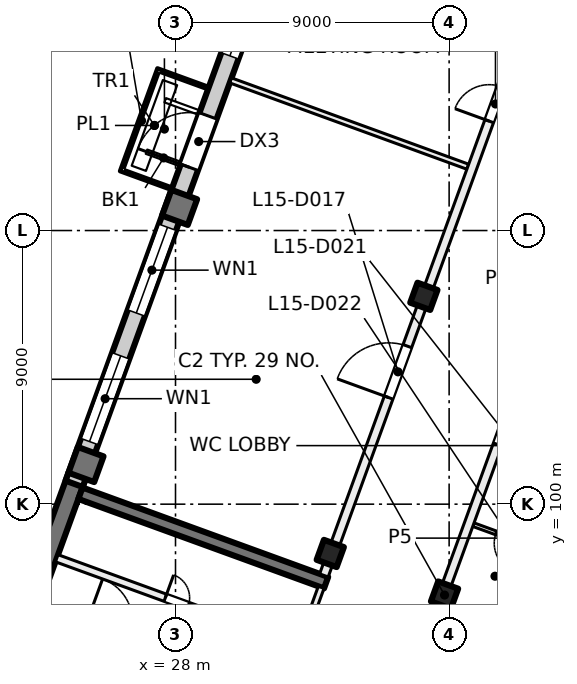
"""IFC4 building model, lengths in metres.
Left out: names, types, materials, properties, quantities, classifications, styles, units other than length and angle.
Written with IfcOpenShell. Run it as: python <this file> out.ifc"""

import sys

from ifc_helpers import new_model, si_unit, direction, frame, frame_2d, origin, origin_2d, place, context, subcontext, project, spatial, rectangle, extrude, element, fill, save


model = new_model("IFC4")
c1 = context("Model", 3, precision=1e-05, world=origin(), true_north=direction((0.0, 1.0)))
c2 = subcontext(c1, "Body", "Model", "MODEL_VIEW")
j1 = project(units=[si_unit("LENGTHUNIT", "METRE"), si_unit("PLANEANGLEUNIT", "RADIAN")], contexts=[c1])
p1 = place(None, origin())
s1 = spatial("IfcSite", under=j1, at=p1, CompositionType="ELEMENT")
p2 = place(p1, origin())
s2 = spatial("IfcBuilding", under=s1, at=p2, CompositionType="ELEMENT")
p3 = place(p2, frame((0.0, 0.0, 67.5)))
s3 = spatial("IfcBuildingStorey", under=s2, at=p3, CompositionType="ELEMENT", Elevation=67.5)
for number, where, z_axis, x_axis in (
    (1, (36.849, 97.011, 0.0), (0.0, 0.0, 1.0), (-0.342, -0.94, 0.0)),
    (2, (36.169, 106.836, 0.0), (0.0, 0.0, 1.0), (-0.342, -0.94, 0.0)),
    (3, (33.091, 98.379, 0.0), (0.0, 0.0, 1.0), (-0.342, -0.94, 0.0)),
):
    element("IfcColumn", number, at=place(p3, frame(where, z_axis=z_axis, x_axis=x_axis)), inside=s3, PredefinedType="COLUMN", context=c2, shape_type="SweptSolid", body=[
        extrude(rectangle(XDim=0.7, YDim=0.7, at=origin_2d()), origin(), (0.0, 0.0, 1.0), 4.0),
    ])
for number, where, z_axis, x_axis in (
    (4, (28.134, 109.76, 0.0), (0.0, 0.0, 1.0), (-0.342, -0.94, 0.0)),
    (5, (25.056, 101.303, 0.0), (0.0, 0.0, 1.0), (-0.342, -0.94, 0.0)),
):
    element("IfcColumn", number, at=place(p3, frame(where, z_axis=z_axis, x_axis=x_axis)), inside=s3, PredefinedType="COLUMN", context=c2, shape_type="SweptSolid", body=[
        extrude(rectangle(XDim=0.9, YDim=0.9, at=origin_2d()), origin(), (0.0, 0.0, 1.0), 4.0),
    ])
p4 = place(p3, frame((21.717, 92.568, 0.0), z_axis=(0.0, 0.0, 1.0), x_axis=(0.342016162452, 0.939694069696, 0.0)))
e6 = element("IfcWall", 6, at=p4, inside=s3, PredefinedType="SHEAR", context=c2, shape_type="SweptSolid", body=[
    extrude(rectangle(XDim=8.9, YDim=0.6, at=frame_2d((4.45, 0.0))), origin(), (0.0, 0.0, 1.0), 4.0),
])
p5 = place(p3, frame((32.953, 97.418, 0.0), z_axis=(0.0, 0.0, 1.0), x_axis=(-0.93969060187, 0.342025690201, 0.0)))
e7 = element("IfcWall", 7, at=p5, inside=s3, PredefinedType="SHEAR", context=c2, shape_type="SweptSolid", body=[
    extrude(rectangle(XDim=8.6, YDim=0.4, at=frame_2d((4.3, 0.0))), origin(), (0.0, 0.0, 1.0), 4.0),
])
p6 = place(p3, frame((24.666, 100.669, 0.0), z_axis=(0.0, 0.0, 1.0), x_axis=(0.34201964167, 0.939692803373, 0.0)))
e8 = element("IfcWall", 8, at=p6, inside=s3, PredefinedType="SOLIDWALL", context=c2, shape_type="SweptSolid", body=[
    extrude(rectangle(XDim=32.884, YDim=0.6, at=frame_2d((16.442, 0.0))), origin(), (0.0, 0.0, 1.0), 3.625),
])
p7 = place(p6, frame((1.48, 0.0, 0.9)))
e9 = element("IfcOpeningElement", 9, at=p7, cuts=e8, PredefinedType="OPENING", context=c2, shape_type="SweptSolid", body=[
    extrude(rectangle(XDim=3.0, YDim=2.4, at=frame_2d((1.5, 1.2))), frame((0.0, 0.31, 0.0), z_axis=(0.0, -1.0, 0.0), x_axis=(1.0, 0.0, 0.0)), (0.0, 0.0, 1.0), 0.62),
])
p8 = place(p6, frame((5.98, 0.0, 0.9)))
e10 = element("IfcOpeningElement", 10, at=p8, cuts=e8, PredefinedType="OPENING", context=c2, shape_type="SweptSolid", body=[
    extrude(rectangle(XDim=3.0, YDim=2.4, at=frame_2d((1.5, 1.2))), frame((0.0, 0.31, 0.0), z_axis=(0.0, -1.0, 0.0), x_axis=(1.0, 0.0, 0.0)), (0.0, 0.0, 1.0), 0.62),
])
p9 = place(p6, frame((11.08, 0.0, 0.0)))
e11 = element("IfcOpeningElement", 11, at=p9, cuts=e8, PredefinedType="OPENING", context=c2, shape_type="SweptSolid", body=[
    extrude(rectangle(XDim=1.8, YDim=2.4, at=frame_2d((0.9, 1.2))), frame((0.0, 0.31, 0.0), z_axis=(0.0, -1.0, 0.0), x_axis=(1.0, 0.0, 0.0)), (0.0, 0.0, 1.0), 0.62),
])
p10 = place(p6, frame((14.98, 0.0, 0.9)))
e12 = element("IfcOpeningElement", 12, at=p10, cuts=e8, PredefinedType="OPENING", context=c2, shape_type="SweptSolid", body=[
    extrude(rectangle(XDim=3.0, YDim=2.4, at=frame_2d((1.5, 1.2))), frame((0.0, 0.31, 0.0), z_axis=(0.0, -1.0, 0.0), x_axis=(1.0, 0.0, 0.0)), (0.0, 0.0, 1.0), 0.62),
])
p11 = place(p6, frame((19.48, 0.0, 0.9)))
e13 = element("IfcOpeningElement", 13, at=p11, cuts=e8, PredefinedType="OPENING", context=c2, shape_type="SweptSolid", body=[
    extrude(rectangle(XDim=3.0, YDim=2.4, at=frame_2d((1.5, 1.2))), frame((0.0, 0.31, 0.0), z_axis=(0.0, -1.0, 0.0), x_axis=(1.0, 0.0, 0.0)), (0.0, 0.0, 1.0), 0.62),
])
p12 = place(p6, frame((24.58, 0.0, 0.0)))
e14 = element("IfcOpeningElement", 14, at=p12, cuts=e8, PredefinedType="OPENING", context=c2, shape_type="SweptSolid", body=[
    extrude(rectangle(XDim=1.8, YDim=2.4, at=frame_2d((0.9, 1.2))), frame((0.0, 0.31, 0.0), z_axis=(0.0, -1.0, 0.0), x_axis=(1.0, 0.0, 0.0)), (0.0, 0.0, 1.0), 0.62),
])
p13 = place(p6, frame((28.48, 0.0, 0.9)))
e15 = element("IfcOpeningElement", 15, at=p13, cuts=e8, PredefinedType="OPENING", context=c2, shape_type="SweptSolid", body=[
    extrude(rectangle(XDim=3.0, YDim=2.4, at=frame_2d((1.5, 1.2))), frame((0.0, 0.31, 0.0), z_axis=(0.0, -1.0, 0.0), x_axis=(1.0, 0.0, 0.0)), (0.0, 0.0, 1.0), 0.62),
])
p14 = place(p3, frame((31.491, 93.693, 0.0), z_axis=(0.0, 0.0, 1.0), x_axis=(0.341995824804, 0.939701471648, 0.0)))
e16 = element("IfcWall", 16, at=p14, inside=s3, PredefinedType="PARTITIONING", context=c2, shape_type="SweptSolid", body=[
    extrude(rectangle(XDim=3.8, YDim=0.2, at=frame_2d((1.9, 0.0))), origin(), (0.0, 0.0, 1.0), 3.625),
])
p15 = place(p14, frame((0.3, 0.0, 0.0)))
e17 = element("IfcOpeningElement", 17, at=p15, cuts=e16, PredefinedType="OPENING", context=c2, shape_type="SweptSolid", body=[
    extrude(rectangle(XDim=1.2, YDim=2.1, at=frame_2d((0.6, 1.05))), frame((0.0, 0.11, 0.0), z_axis=(0.0, -1.0, 0.0), x_axis=(1.0, 0.0, 0.0)), (0.0, 0.0, 1.0), 0.22),
])
p16 = place(p3, frame((23.538, 96.694, 0.0), z_axis=(0.0, 0.0, 1.0), x_axis=(0.939691552312, -0.342023078919, 0.0)))
e18 = element("IfcWall", 18, at=p16, inside=s3, PredefinedType="PARTITIONING", context=c2, shape_type="SweptSolid", body=[
    extrude(rectangle(XDim=8.4, YDim=0.2, at=frame_2d((4.2, 0.0))), origin(), (0.0, 0.0, 1.0), 3.625),
])
p17 = place(p16, frame((1.65, 0.0, 0.0)))
e19 = element("IfcOpeningElement", 19, at=p17, cuts=e18, PredefinedType="OPENING", context=c2, shape_type="SweptSolid", body=[
    extrude(rectangle(XDim=1.5, YDim=2.1, at=frame_2d((0.75, 1.05))), frame((0.0, 0.11, 0.0), z_axis=(0.0, -1.0, 0.0), x_axis=(1.0, 0.0, 0.0)), (0.0, 0.0, 1.0), 0.22),
])
p18 = place(p3, frame((24.094, 98.221, 0.0), z_axis=(0.0, 0.0, 1.0), x_axis=(0.939691552312, -0.342023078919, 0.0)))
e20 = element("IfcWall", 20, at=p18, inside=s3, PredefinedType="PARTITIONING", context=c2, shape_type="SweptSolid", body=[
    extrude(rectangle(XDim=8.4, YDim=0.25, at=frame_2d((4.2, 0.0))), origin(), (0.0, 0.0, 1.0), 3.625),
])
p19 = place(p18, frame((3.8, 0.0, 0.0)))
e21 = element("IfcOpeningElement", 21, at=p19, cuts=e20, PredefinedType="OPENING", context=c2, shape_type="SweptSolid", body=[
    extrude(rectangle(XDim=0.8, YDim=2.1, at=frame_2d((0.4, 1.05))), frame((0.0, 0.135, 0.0), z_axis=(0.0, -1.0, 0.0), x_axis=(1.0, 0.0, 0.0)), (0.0, 0.0, 1.0), 0.27),
])
p20 = place(p3, frame((29.814, 113.938, 0.0), z_axis=(0.0, 0.0, 1.0), x_axis=(0.939697205528, -0.342007546586, 0.0)))
e22 = element("IfcWall", 22, at=p20, inside=s3, PredefinedType="PARTITIONING", context=c2, shape_type="SweptSolid", body=[
    extrude(rectangle(XDim=8.301, YDim=0.175, at=frame_2d((4.15, 0.0))), origin(), (0.0, 0.0, 1.0), 3.625),
])
p21 = place(p3, frame((32.881, 97.657, 0.0), z_axis=(0.0, 0.0, 1.0), x_axis=(0.342017360004, 0.939693633828, 0.0)))
e23 = element("IfcWall", 23, at=p21, inside=s3, PredefinedType="PARTITIONING", context=c2, shape_type="SweptSolid", body=[
    extrude(rectangle(XDim=34.516, YDim=0.3, at=frame_2d((17.258, 0.0))), origin(), (0.0, 0.0, 1.0), 3.625),
])
p22 = place(p21, frame((6.225, 0.0, 0.0)))
e24 = element("IfcOpeningElement", 24, at=p22, cuts=e23, PredefinedType="OPENING", context=c2, shape_type="SweptSolid", body=[
    extrude(rectangle(XDim=1.8, YDim=2.1, at=frame_2d((0.9, 1.05))), frame((0.0, 0.16, 0.0), z_axis=(0.0, -1.0, 0.0), x_axis=(1.0, 0.0, 0.0)), (0.0, 0.0, 1.0), 0.32),
])
p23 = place(p21, frame((15.9, 0.0, 0.0)))
e25 = element("IfcOpeningElement", 25, at=p23, cuts=e23, PredefinedType="OPENING", context=c2, shape_type="SweptSolid", body=[
    extrude(rectangle(XDim=1.2, YDim=2.1, at=frame_2d((0.6, 1.05))), frame((0.0, 0.16, 0.0), z_axis=(0.0, -1.0, 0.0), x_axis=(1.0, 0.0, 0.0)), (0.0, 0.0, 1.0), 0.32),
])
p24 = place(p21, frame((20.5, 0.0, 0.0)))
e26 = element("IfcOpeningElement", 26, at=p24, cuts=e23, PredefinedType="OPENING", context=c2, shape_type="SweptSolid", body=[
    extrude(rectangle(XDim=1.0, YDim=2.1, at=frame_2d((0.5, 1.05))), frame((0.0, 0.16, 0.0), z_axis=(0.0, -1.0, 0.0), x_axis=(1.0, 0.0, 0.0)), (0.0, 0.0, 1.0), 0.32),
])
p25 = place(p21, frame((25.0, 0.0, 0.0)))
e27 = element("IfcOpeningElement", 27, at=p25, cuts=e23, PredefinedType="OPENING", context=c2, shape_type="SweptSolid", body=[
    extrude(rectangle(XDim=1.0, YDim=2.1, at=frame_2d((0.5, 1.05))), frame((0.0, 0.16, 0.0), z_axis=(0.0, -1.0, 0.0), x_axis=(1.0, 0.0, 0.0)), (0.0, 0.0, 1.0), 0.32),
])
p26 = place(p21, frame((30.562, 0.0, 0.0)))
e28 = element("IfcOpeningElement", 28, at=p26, cuts=e23, PredefinedType="OPENING", context=c2, shape_type="SweptSolid", body=[
    extrude(rectangle(XDim=1.0, YDim=2.1, at=frame_2d((0.5, 1.05))), frame((0.0, 0.16, 0.0), z_axis=(0.0, -1.0, 0.0), x_axis=(1.0, 0.0, 0.0)), (0.0, 0.0, 1.0), 0.32),
])
p27 = place(p3, frame((40.229, 98.441, 0.0), z_axis=(0.0, 0.0, 1.0), x_axis=(-0.939663852573, 0.342099173001, 0.0)))
e29 = element("IfcWall", 29, at=p27, inside=s3, PredefinedType="PARTITIONING", context=c2, shape_type="SweptSolid", body=[
    extrude(rectangle(XDim=2.587, YDim=0.125, at=frame_2d((1.293, 0.0))), origin(), (0.0, 0.0, 1.0), 3.625),
])
p28 = place(p27, frame((0.794, 0.0, 0.0)))
e30 = element("IfcOpeningElement", 30, at=p28, cuts=e29, PredefinedType="OPENING", context=c2, shape_type="SweptSolid", body=[
    extrude(rectangle(XDim=1.0, YDim=2.1, at=frame_2d((0.5, 1.05))), frame((0.0, 0.073, 0.0), z_axis=(0.0, -1.0, 0.0), x_axis=(1.0, 0.0, 0.0)), (0.0, 0.0, 1.0), 0.145),
])
p29 = place(p3, frame((44.612, 118.483, 0.0), z_axis=(0.0, 0.0, 1.0), x_axis=(-0.342043123066, -0.939684256526, 0.0)))
e31 = element("IfcWall", 31, at=p29, inside=s3, PredefinedType="PARTITIONING", context=c2, shape_type="SweptSolid", body=[
    extrude(rectangle(XDim=23.582, YDim=0.3, at=frame_2d((11.791, 0.0))), origin(), (0.0, 0.0, 1.0), 3.625),
])
p30 = place(p29, frame((16.583, 0.0, 0.0)))
e32 = element("IfcOpeningElement", 32, at=p30, cuts=e31, PredefinedType="OPENING", context=c2, shape_type="SweptSolid", body=[
    extrude(rectangle(XDim=1.0, YDim=2.1, at=frame_2d((0.5, 1.05))), frame((0.0, 0.16, 0.0), z_axis=(0.0, -1.0, 0.0), x_axis=(1.0, 0.0, 0.0)), (0.0, 0.0, 1.0), 0.32),
])
p31 = place(p29, frame((10.982, 0.0, 0.0)))
e33 = element("IfcOpeningElement", 33, at=p31, cuts=e31, PredefinedType="OPENING", context=c2, shape_type="SweptSolid", body=[
    extrude(rectangle(XDim=1.2, YDim=2.1, at=frame_2d((0.6, 1.05))), frame((0.0, 0.16, 0.0), z_axis=(0.0, -1.0, 0.0), x_axis=(1.0, 0.0, 0.0)), (0.0, 0.0, 1.0), 0.32),
])
p32 = place(p29, frame((5.756, 0.0, 0.0)))
e34 = element("IfcOpeningElement", 34, at=p32, cuts=e31, PredefinedType="OPENING", context=c2, shape_type="SweptSolid", body=[
    extrude(rectangle(XDim=1.8, YDim=2.1, at=frame_2d((0.9, 1.05))), frame((0.0, 0.16, 0.0), z_axis=(0.0, -1.0, 0.0), x_axis=(1.0, 0.0, 0.0)), (0.0, 0.0, 1.0), 0.32),
])
p33 = place(p7, origin())
e35 = element("IfcWindow", 35, at=p33, inside=s3, PartitioningType="SINGLE_PANEL", PredefinedType="WINDOW", context=c2, shape_type="SweptSolid", body=[
    extrude(rectangle(XDim=3.0, YDim=2.4, at=frame_2d((1.5, 1.2))), frame((0.0, 0.03, 0.0), z_axis=(0.0, -1.0, 0.0), x_axis=(1.0, 0.0, 0.0)), (0.0, 0.0, 1.0), 0.06),
])
fill(e9, e35)
p34 = place(p8, origin())
e36 = element("IfcWindow", 36, at=p34, inside=s3, PartitioningType="SINGLE_PANEL", PredefinedType="WINDOW", context=c2, shape_type="SweptSolid", body=[
    extrude(rectangle(XDim=3.0, YDim=2.4, at=frame_2d((1.5, 1.2))), frame((0.0, 0.03, 0.0), z_axis=(0.0, -1.0, 0.0), x_axis=(1.0, 0.0, 0.0)), (0.0, 0.0, 1.0), 0.06),
])
fill(e10, e36)
p35 = place(p9, origin())
e37 = element("IfcDoor", 37, at=p35, inside=s3, OperationType="DOUBLE_DOOR_SINGLE_SWING", PredefinedType="DOOR", context=c2, shape_type="SweptSolid", body=[
    extrude(rectangle(XDim=1.8, YDim=2.4, at=frame_2d((0.9, 1.2))), frame((0.0, 0.025, 0.0), z_axis=(0.0, -1.0, 0.0), x_axis=(1.0, 0.0, 0.0)), (0.0, 0.0, 1.0), 0.05),
])
fill(e11, e37)
p36 = place(p10, origin())
e38 = element("IfcWindow", 38, at=p36, inside=s3, PartitioningType="SINGLE_PANEL", PredefinedType="WINDOW", context=c2, shape_type="SweptSolid", body=[
    extrude(rectangle(XDim=3.0, YDim=2.4, at=frame_2d((1.5, 1.2))), frame((0.0, 0.03, 0.0), z_axis=(0.0, -1.0, 0.0), x_axis=(1.0, 0.0, 0.0)), (0.0, 0.0, 1.0), 0.06),
])
fill(e12, e38)
p37 = place(p19, origin())
e39 = element("IfcDoor", 39, at=p37, inside=s3, OperationType="SINGLE_SWING_LEFT", PredefinedType="DOOR", context=c2, shape_type="SweptSolid", body=[
    extrude(rectangle(XDim=0.8, YDim=2.1, at=frame_2d((0.4, 1.05))), frame((0.0, 0.025, 0.0), z_axis=(0.0, -1.0, 0.0), x_axis=(1.0, 0.0, 0.0)), (0.0, 0.0, 1.0), 0.05),
])
fill(e21, e39)
p38 = place(p22, origin())
e40 = element("IfcDoor", 40, at=p38, inside=s3, OperationType="DOUBLE_DOOR_SINGLE_SWING", PredefinedType="DOOR", context=c2, shape_type="SweptSolid", body=[
    extrude(rectangle(XDim=1.8, YDim=2.1, at=frame_2d((0.9, 1.05))), frame((0.0, 0.025, 0.0), z_axis=(0.0, -1.0, 0.0), x_axis=(1.0, 0.0, 0.0)), (0.0, 0.0, 1.0), 0.05),
])
fill(e24, e40)
p39 = place(p23, origin())
e41 = element("IfcDoor", 41, at=p39, inside=s3, OperationType="DOUBLE_DOOR_SINGLE_SWING", PredefinedType="DOOR", context=c2, shape_type="SweptSolid", body=[
    extrude(rectangle(XDim=1.2, YDim=2.1, at=frame_2d((0.6, 1.05))), frame((0.0, 0.025, 0.0), z_axis=(0.0, -1.0, 0.0), x_axis=(1.0, 0.0, 0.0)), (0.0, 0.0, 1.0), 0.05),
])
fill(e25, e41)
p40 = place(p30, origin())
e42 = element("IfcDoor", 42, at=p40, inside=s3, OperationType="SINGLE_SWING_LEFT", PredefinedType="DOOR", context=c2, shape_type="SweptSolid", body=[
    extrude(rectangle(XDim=1.0, YDim=2.1, at=frame_2d((0.5, 1.05))), frame((0.0, 0.025, 0.0), z_axis=(0.0, -1.0, 0.0), x_axis=(1.0, 0.0, 0.0)), (0.0, 0.0, 1.0), 0.05),
])
fill(e32, e42)
p41 = place(p28, origin())
e43 = element("IfcDoor", 43, at=p41, inside=s3, OperationType="SINGLE_SWING_RIGHT", PredefinedType="DOOR", context=c2, shape_type="SweptSolid", body=[
    extrude(rectangle(XDim=1.0, YDim=2.1, at=frame_2d((0.5, 1.05))), frame((0.0, 0.025, 0.0), z_axis=(0.0, -1.0, 0.0), x_axis=(1.0, 0.0, 0.0)), (0.0, 0.0, 1.0), 0.05),
])
fill(e30, e43)
save(model, sys.argv[1])
